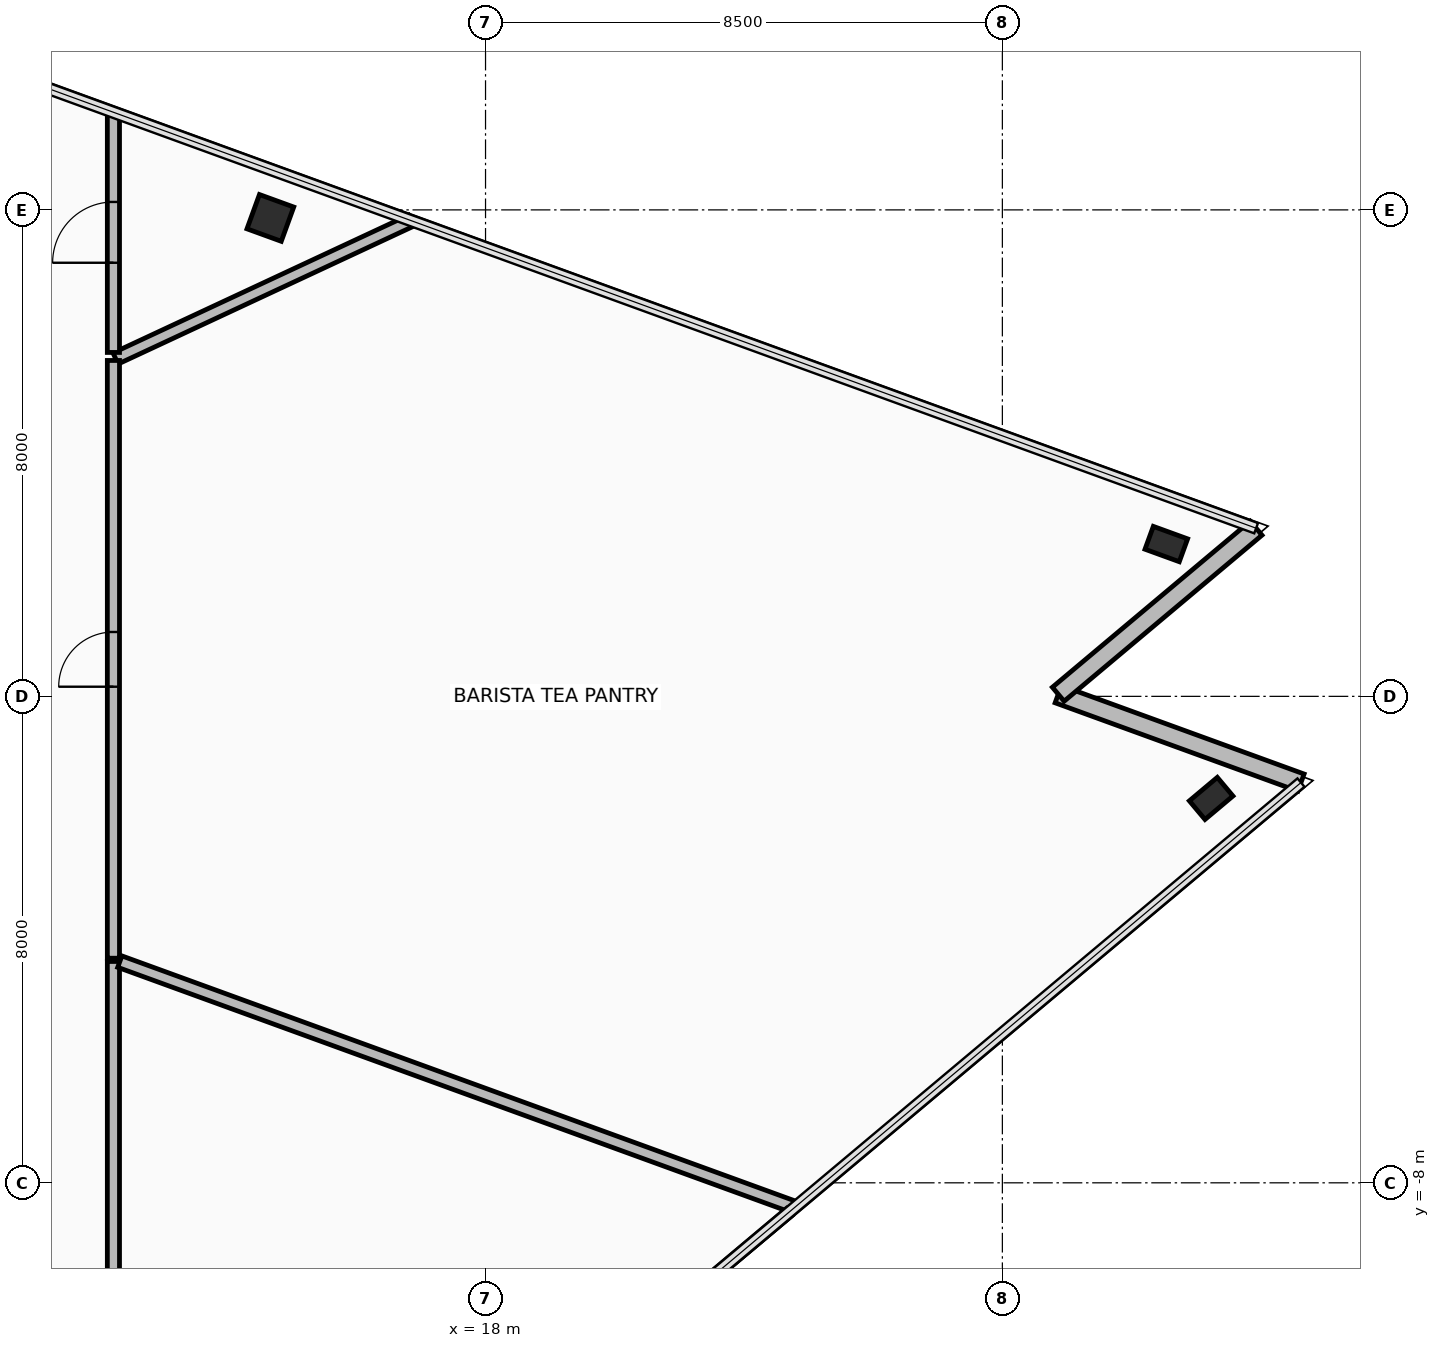
"""IFC4 building model, lengths in metres.
Left out: names, types, materials, properties, quantities, classifications, styles, units other than length and angle.
Written with IfcOpenShell. Run it as: python <this file> out.ifc"""

import sys

from ifc_helpers import new_model, si_unit, direction, frame, frame_2d, origin, origin_2d, place, context, subcontext, project, spatial, rectangle, hollow_rectangle, extrude, element, fill, save


model = new_model("IFC4")
c1 = context("Model", 3, precision=1e-05, world=origin(), true_north=direction((0.0, 1.0)))
c2 = subcontext(c1, "Body", "Model", "MODEL_VIEW")
j1 = project(units=[si_unit("LENGTHUNIT", "METRE"), si_unit("PLANEANGLEUNIT", "RADIAN")], contexts=[c1])
p1 = place(None, origin())
s1 = spatial("IfcSite", under=j1, at=p1, CompositionType="ELEMENT")
p2 = place(p1, origin())
s2 = spatial("IfcBuilding", under=s1, at=p2, CompositionType="ELEMENT")
p3 = place(p2, frame((0.0, 0.0, 188.5)))
s3 = spatial("IfcBuildingStorey", under=s2, at=p3, CompositionType="ELEMENT", Elevation=188.5)
for number, where, z_axis, x_axis in (
    (1, (29.934, -1.679, 0.0), (0.0, 0.0, 1.0), (0.766, 0.643, 0.0)),
    (2, (29.196, 2.505, 0.0), (0.0, 0.0, 1.0), (-0.94, 0.342, 0.0)),
):
    element("IfcColumn", number, at=place(p3, frame(where, z_axis=z_axis, x_axis=x_axis)), inside=s3, PredefinedType="COLUMN", context=c2, shape_type="SweptSolid", body=[
        extrude(hollow_rectangle(XDim=0.4, YDim=0.6, WallThickness=0.03, at=origin_2d()), origin(), (0.0, 0.0, 1.0), 3.6),
    ])
p4 = place(p3, frame((14.461, 7.868, 0.0), z_axis=(0.0, 0.0, 1.0), x_axis=(-0.939692023847, 0.342021783398, 0.0)))
e3 = element("IfcColumn", 3, at=p4, inside=s3, PredefinedType="COLUMN", context=c2, shape_type="SweptSolid", body=[
    extrude(hollow_rectangle(XDim=0.6, YDim=0.6, WallThickness=0.036, at=origin_2d()), origin(), (0.0, 0.0, 1.0), 3.6),
])
for number, where, z_axis, x_axis in (
    (4, (31.411, -1.418, 0.0), (0.0, 0.0, 1.0), (-0.94, 0.342, 0.0)),
    (5, (27.419, 0.035, 0.0), (0.0, 0.0, 1.0), (0.766, 0.643, 0.0)),
):
    element("IfcWall", number, at=place(p3, frame(where, z_axis=z_axis, x_axis=x_axis)), inside=s3, PredefinedType="STANDARD", context=c2, shape_type="SweptSolid", body=[
        extrude(rectangle(XDim=4.248, YDim=0.3, at=frame_2d((2.124, 0.0))), origin(), (0.0, 0.0, 1.0), 2.715),
    ])
p5 = place(p3, frame((11.88, -10.579, 0.0), z_axis=(0.0, 0.0, 1.0), x_axis=(0.0, 1.0, 0.0)))
e6 = element("IfcWall", 6, at=p5, inside=s3, PredefinedType="PARTITIONING", context=c2, shape_type="SweptSolid", body=[
    extrude(rectangle(XDim=6.22, YDim=0.2, at=frame_2d((3.11, 0.0))), origin(), (0.0, 0.0, 1.0), 2.865),
])
p6 = place(p3, frame((11.985, -4.362, 0.0), z_axis=(0.0, 0.0, 1.0), x_axis=(0.939698056563, -0.34200520828, 0.0)))
e7 = element("IfcWall", 7, at=p6, inside=s3, PredefinedType="PARTITIONING", context=c2, shape_type="SweptSolid", body=[
    extrude(rectangle(XDim=11.814, YDim=0.2, at=frame_2d((5.907, 0.0))), origin(), (0.0, 0.0, 1.0), 2.715),
])
p7 = place(p3, frame((22.994, -8.481, 0.0), z_axis=(0.0, 0.0, 1.0), x_axis=(-0.766042878482, -0.642789474343, 0.0)))
e8 = element("IfcWall", 8, at=p7, inside=s3, PredefinedType="PARTITIONING", context=c2, shape_type="SweptSolid", body=[
    extrude(rectangle(XDim=21.521, YDim=0.15, at=frame_2d((10.761, 0.0))), origin(), (0.0, 0.0, 1.0), 3.42),
])
p8 = place(p3, frame((16.777, 7.823, 0.0), z_axis=(0.0, 0.0, 1.0), x_axis=(-0.906309845739, -0.42261384681, 0.0)))
e9 = element("IfcWall", 9, at=p8, inside=s3, PredefinedType="PARTITIONING", context=c2, shape_type="SweptSolid", body=[
    extrude(rectangle(XDim=5.364, YDim=0.2, at=frame_2d((2.682, 0.0))), origin(), (0.0, 0.0, 1.0), 2.715),
])
p9 = place(p3, frame((11.88, 5.656, 0.0), z_axis=(0.0, 0.0, 1.0), x_axis=(0.0, 1.0, 0.0)))
e10 = element("IfcWall", 10, at=p9, inside=s3, PredefinedType="PARTITIONING", context=c2, shape_type="SweptSolid", body=[
    extrude(rectangle(XDim=3.95, YDim=0.2, at=frame_2d((1.975, 0.0))), origin(), (0.0, 0.0, 1.0), 2.715),
])
p10 = place(p9, frame((1.475, 0.0, 0.0)))
e11 = element("IfcOpeningElement", 11, at=p10, cuts=e10, PredefinedType="OPENING", context=c2, shape_type="SweptSolid", body=[
    extrude(rectangle(XDim=1.0, YDim=2.15, at=frame_2d((0.5, 1.075))), frame((0.0, 0.11, 0.0), z_axis=(0.0, -1.0, 0.0), x_axis=(1.0, 0.0, 0.0)), (0.0, 0.0, 1.0), 0.22),
])
p11 = place(p3, frame((11.88, -4.306, 0.0), z_axis=(0.0, 0.0, 1.0), x_axis=(0.0, 1.0, 0.0)))
e12 = element("IfcWall", 12, at=p11, inside=s3, PredefinedType="PARTITIONING", context=c2, shape_type="SweptSolid", body=[
    extrude(rectangle(XDim=9.83, YDim=0.2, at=frame_2d((4.915, 0.0))), origin(), (0.0, 0.0, 1.0), 3.42),
])
p12 = place(p11, frame((4.465, 0.0, 0.0)))
e13 = element("IfcOpeningElement", 13, at=p12, cuts=e12, PredefinedType="OPENING", context=c2, shape_type="SweptSolid", body=[
    extrude(rectangle(XDim=0.9, YDim=2.1, at=frame_2d((0.45, 1.05))), frame((0.0, 0.11, 0.0), z_axis=(0.0, -1.0, 0.0), x_axis=(1.0, 0.0, 0.0)), (0.0, 0.0, 1.0), 0.22),
])
p13 = place(p10, origin())
e14 = element("IfcDoor", 14, at=p13, inside=s3, OperationType="SINGLE_SWING_RIGHT", PredefinedType="DOOR", context=c2, shape_type="SweptSolid", body=[
    extrude(rectangle(XDim=1.0, YDim=2.15, at=frame_2d((0.5, 1.075))), frame((0.0, 0.025, 0.0), z_axis=(0.0, -1.0, 0.0), x_axis=(1.0, 0.0, 0.0)), (0.0, 0.0, 1.0), 0.05),
])
fill(e11, e14)
p14 = place(p12, origin())
e15 = element("IfcDoor", 15, at=p14, inside=s3, OperationType="SINGLE_SWING_LEFT", PredefinedType="DOOR", context=c2, shape_type="SweptSolid", body=[
    extrude(rectangle(XDim=0.9, YDim=2.1, at=frame_2d((0.45, 1.05))), frame((0.0, 0.025, 0.0), z_axis=(0.0, -1.0, 0.0), x_axis=(1.0, 0.0, 0.0)), (0.0, 0.0, 1.0), 0.05),
])
fill(e13, e15)
save(model, sys.argv[1])
